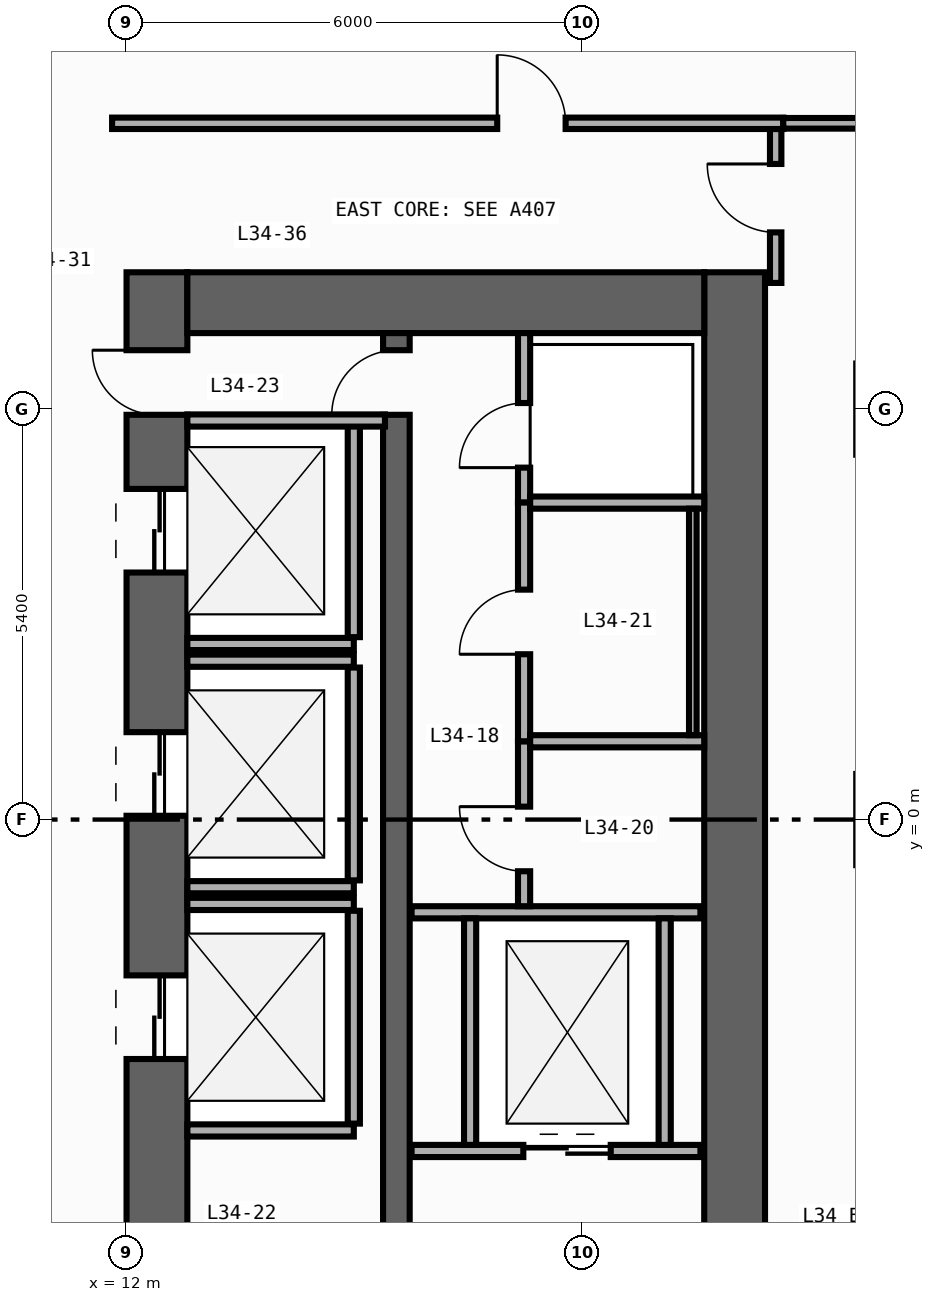
"""IFC4 building model, lengths in metres.
Left out: names, types, materials, properties, quantities, classifications, styles, units other than length and angle.
Written with IfcOpenShell. Run it as: python <this file> out.ifc"""

import sys

from ifc_helpers import new_model, si_unit, direction, frame, frame_2d, origin, origin_2d, place, context, subcontext, project, spatial, rectangle, extrude, element, fill, save


model = new_model("IFC4")
c1 = context("Model", 3, precision=1e-05, world=origin(), true_north=direction((0.0, 1.0)))
c2 = subcontext(c1, "Body", "Model", "MODEL_VIEW")
j1 = project(units=[si_unit("LENGTHUNIT", "METRE"), si_unit("PLANEANGLEUNIT", "RADIAN")], contexts=[c1])
p1 = place(None, origin())
s1 = spatial("IfcSite", under=j1, at=p1, CompositionType="ELEMENT")
p2 = place(p1, origin())
s2 = spatial("IfcBuilding", under=s1, at=p2, CompositionType="ELEMENT")
p3 = place(p2, frame((0.0, 0.0, 147.8)))
s3 = spatial("IfcBuildingStorey", under=s2, at=p3, CompositionType="ELEMENT", Elevation=147.8)
p4 = place(p3, frame((12.4, -19.8, 0.0), z_axis=(0.0, 0.0, 1.0), x_axis=(0.0, 1.0, 0.0)))
e1 = element("IfcWall", 1, at=p4, inside=s3, PredefinedType="SHEAR", context=c2, shape_type="SweptSolid", body=[
    extrude(rectangle(XDim=27.0, YDim=0.8, at=frame_2d((13.5, 0.0))), origin(), (0.0, 0.0, 1.0), 3.85),
])
p5 = place(p4, frame((23.05, 0.0, 0.0)))
e2 = element("IfcOpeningElement", 2, at=p5, cuts=e1, PredefinedType="OPENING", context=c2, shape_type="SweptSolid", body=[
    extrude(rectangle(XDim=1.1, YDim=2.2, at=frame_2d((0.55, 1.1))), frame((0.0, 0.41, 0.0), z_axis=(0.0, -1.0, 0.0), x_axis=(1.0, 0.0, 0.0)), (0.0, 0.0, 1.0), 0.82),
])
p6 = place(p4, frame((19.85, 0.0, 0.0)))
e3 = element("IfcOpeningElement", 3, at=p6, cuts=e1, PredefinedType="OPENING", context=c2, shape_type="SweptSolid", body=[
    extrude(rectangle(XDim=1.1, YDim=2.2, at=frame_2d((0.55, 1.1))), frame((0.0, 0.41, 0.0), z_axis=(0.0, -1.0, 0.0), x_axis=(1.0, 0.0, 0.0)), (0.0, 0.0, 1.0), 0.82),
])
p7 = place(p4, frame((16.65, 0.0, 0.0)))
e4 = element("IfcOpeningElement", 4, at=p7, cuts=e1, PredefinedType="OPENING", context=c2, shape_type="SweptSolid", body=[
    extrude(rectangle(XDim=1.1, YDim=2.2, at=frame_2d((0.55, 1.1))), frame((0.0, 0.41, 0.0), z_axis=(0.0, -1.0, 0.0), x_axis=(1.0, 0.0, 0.0)), (0.0, 0.0, 1.0), 0.82),
])
p8 = place(p4, frame((6.275, 0.0, 0.0)))
e5 = element("IfcOpeningElement", 5, at=p8, cuts=e1, PredefinedType="OPENING", context=c2, shape_type="SweptSolid", body=[
    extrude(rectangle(XDim=0.85, YDim=2.1, at=frame_2d((0.425, 1.05))), frame((0.0, 0.41, 0.0), z_axis=(0.0, -1.0, 0.0), x_axis=(1.0, 0.0, 0.0)), (0.0, 0.0, 1.0), 0.82),
])
p9 = place(p4, frame((8.575, 0.0, 0.0)))
e6 = element("IfcOpeningElement", 6, at=p9, cuts=e1, PredefinedType="OPENING", context=c2, shape_type="SweptSolid", body=[
    extrude(rectangle(XDim=0.85, YDim=2.1, at=frame_2d((0.425, 1.05))), frame((0.0, 0.41, 0.0), z_axis=(0.0, -1.0, 0.0), x_axis=(1.0, 0.0, 0.0)), (0.0, 0.0, 1.0), 0.82),
])
p10 = place(p4, frame((10.675, 0.0, 0.0)))
e7 = element("IfcOpeningElement", 7, at=p10, cuts=e1, PredefinedType="OPENING", context=c2, shape_type="SweptSolid", body=[
    extrude(rectangle(XDim=0.85, YDim=2.1, at=frame_2d((0.425, 1.05))), frame((0.0, 0.41, 0.0), z_axis=(0.0, -1.0, 0.0), x_axis=(1.0, 0.0, 0.0)), (0.0, 0.0, 1.0), 0.82),
])
p11 = place(p4, frame((12.725, 0.0, 0.0)))
e8 = element("IfcOpeningElement", 8, at=p11, cuts=e1, PredefinedType="OPENING", context=c2, shape_type="SweptSolid", body=[
    extrude(rectangle(XDim=1.15, YDim=2.2, at=frame_2d((0.575, 1.1))), frame((0.0, 0.41, 0.0), z_axis=(0.0, -1.0, 0.0), x_axis=(1.0, 0.0, 0.0)), (0.0, 0.0, 1.0), 0.82),
])
p12 = place(p4, frame((25.125, 0.0, 0.0)))
e9 = element("IfcOpeningElement", 9, at=p12, cuts=e1, PredefinedType="OPENING", context=c2, shape_type="SweptSolid", body=[
    extrude(rectangle(XDim=0.85, YDim=2.1, at=frame_2d((0.425, 1.05))), frame((0.0, 0.41, 0.0), z_axis=(0.0, -1.0, 0.0), x_axis=(1.0, 0.0, 0.0)), (0.0, 0.0, 1.0), 0.82),
])
p13 = place(p3, frame((20.0, -19.8, 0.0), z_axis=(0.0, 0.0, 1.0), x_axis=(0.0, 1.0, 0.0)))
e10 = element("IfcWall", 10, at=p13, inside=s3, PredefinedType="SHEAR", context=c2, shape_type="SweptSolid", body=[
    extrude(rectangle(XDim=27.0, YDim=0.8, at=frame_2d((13.5, 0.0))), origin(), (0.0, 0.0, 1.0), 3.85),
])
p14 = place(p3, frame((12.8, 6.8, 0.0), z_axis=(0.0, 0.0, 1.0), x_axis=(1.0, 0.0, 0.0)))
e11 = element("IfcWall", 11, at=p14, inside=s3, PredefinedType="SHEAR", context=c2, shape_type="SweptSolid", body=[
    extrude(rectangle(XDim=6.8, YDim=0.8, at=frame_2d((3.4, 0.0))), origin(), (0.0, 0.0, 1.0), 3.85),
])
p15 = place(p3, frame((15.55, -19.0, 0.0), z_axis=(0.0, 0.0, 1.0), x_axis=(0.0, 1.0, 0.0)))
e12 = element("IfcWall", 12, at=p15, inside=s3, PredefinedType="SHEAR", context=c2, shape_type="SweptSolid", body=[
    extrude(rectangle(XDim=25.4, YDim=0.35, at=frame_2d((12.7, 0.0))), origin(), (0.0, 0.0, 1.0), 3.85),
])
p16 = place(p15, frame((11.925, 0.0, 0.0)))
e13 = element("IfcOpeningElement", 13, at=p16, cuts=e12, PredefinedType="OPENING", context=c2, shape_type="SweptSolid", body=[
    extrude(rectangle(XDim=1.15, YDim=2.2, at=frame_2d((0.575, 1.1))), frame((0.0, 0.185, 0.0), z_axis=(0.0, -1.0, 0.0), x_axis=(1.0, 0.0, 0.0)), (0.0, 0.0, 1.0), 0.37),
])
p17 = place(p15, frame((24.325, 0.0, 0.0)))
e14 = element("IfcOpeningElement", 14, at=p17, cuts=e12, PredefinedType="OPENING", context=c2, shape_type="SweptSolid", body=[
    extrude(rectangle(XDim=0.85, YDim=2.1, at=frame_2d((0.425, 1.05))), frame((0.0, 0.185, 0.0), z_axis=(0.0, -1.0, 0.0), x_axis=(1.0, 0.0, 0.0)), (0.0, 0.0, 1.0), 0.37),
])
for number, where, z_axis, x_axis in (
    (15, (22.2, 0.0, 0.0), (0.0, 0.0, 1.0), (1.0, 0.0, 0.0)),
    (16, (22.2, 5.4, 0.0), (0.0, 0.0, 1.0), (1.0, 0.0, 0.0)),
):
    element("IfcColumn", number, at=place(p3, frame(where, z_axis=z_axis, x_axis=x_axis)), inside=s3, PredefinedType="COLUMN", context=c2, shape_type="SweptSolid", body=[
        extrude(rectangle(XDim=1.2, YDim=1.2, at=origin_2d()), origin(), (0.0, 0.0, 1.0), 4.2),
    ])
p18 = place(p3, frame((12.8, 2.31, 0.0), z_axis=(0.0, 0.0, 1.0), x_axis=(1.0, 0.0, 0.0)))
e17 = element("IfcWall", 17, at=p18, inside=s3, PredefinedType="STANDARD", context=c2, shape_type="SweptSolid", body=[
    extrude(rectangle(XDim=2.19, YDim=0.16, at=frame_2d((1.095, 0.0))), origin(), (0.0, 0.0, 1.0), 3.85),
])
p19 = place(p3, frame((14.99, 2.4, 0.0), z_axis=(0.0, 0.0, 1.0), x_axis=(0.0, 1.0, 0.0)))
e18 = element("IfcWall", 18, at=p19, inside=s3, PredefinedType="STANDARD", context=c2, shape_type="SweptSolid", body=[
    extrude(rectangle(XDim=2.8, YDim=0.16, at=frame_2d((1.4, 0.0))), origin(), (0.0, 0.0, 1.0), 3.85),
])
for number, where, z_axis, x_axis in (
    (19, (12.8, -0.89, 0.0), (0.0, 0.0, 1.0), (1.0, 0.0, 0.0)),
    (20, (12.8, 2.09, 0.0), (0.0, 0.0, 1.0), (1.0, 0.0, 0.0)),
):
    element("IfcWall", number, at=place(p3, frame(where, z_axis=z_axis, x_axis=x_axis)), inside=s3, PredefinedType="STANDARD", context=c2, shape_type="SweptSolid", body=[
        extrude(rectangle(XDim=2.19, YDim=0.16, at=frame_2d((1.095, 0.0))), origin(), (0.0, 0.0, 1.0), 3.85),
    ])
p20 = place(p3, frame((14.99, -0.8, 0.0), z_axis=(0.0, 0.0, 1.0), x_axis=(0.0, 1.0, 0.0)))
e21 = element("IfcWall", 21, at=p20, inside=s3, PredefinedType="STANDARD", context=c2, shape_type="SweptSolid", body=[
    extrude(rectangle(XDim=2.8, YDim=0.16, at=frame_2d((1.4, 0.0))), origin(), (0.0, 0.0, 1.0), 3.85),
])
for number, where, z_axis, x_axis in (
    (22, (12.8, -4.09, 0.0), (0.0, 0.0, 1.0), (1.0, 0.0, 0.0)),
    (23, (12.8, -1.11, 0.0), (0.0, 0.0, 1.0), (1.0, 0.0, 0.0)),
):
    element("IfcWall", number, at=place(p3, frame(where, z_axis=z_axis, x_axis=x_axis)), inside=s3, PredefinedType="STANDARD", context=c2, shape_type="SweptSolid", body=[
        extrude(rectangle(XDim=2.19, YDim=0.16, at=frame_2d((1.095, 0.0))), origin(), (0.0, 0.0, 1.0), 3.85),
    ])
p21 = place(p3, frame((14.99, -4.0, 0.0), z_axis=(0.0, 0.0, 1.0), x_axis=(0.0, 1.0, 0.0)))
e24 = element("IfcWall", 24, at=p21, inside=s3, PredefinedType="STANDARD", context=c2, shape_type="SweptSolid", body=[
    extrude(rectangle(XDim=2.8, YDim=0.16, at=frame_2d((1.4, 0.0))), origin(), (0.0, 0.0, 1.0), 3.85),
])
p22 = place(p3, frame((15.75, -4.36, 0.0), z_axis=(0.0, 0.0, 1.0), x_axis=(1.0, 0.0, 0.0)))
e25 = element("IfcWall", 25, at=p22, inside=s3, PredefinedType="STANDARD", context=c2, shape_type="SweptSolid", body=[
    extrude(rectangle(XDim=3.8, YDim=0.16, at=frame_2d((1.9, 0.0))), origin(), (0.0, 0.0, 1.0), 3.85),
])
p23 = place(p22, frame((1.47, 0.0, 0.0)))
e26 = element("IfcOpeningElement", 26, at=p23, cuts=e25, PredefinedType="OPENING", context=c2, shape_type="SweptSolid", body=[
    extrude(rectangle(XDim=1.15, YDim=2.2, at=frame_2d((0.575, 1.1))), frame((0.0, 0.09, 0.0), z_axis=(0.0, -1.0, 0.0), x_axis=(1.0, 0.0, 0.0)), (0.0, 0.0, 1.0), 0.18),
])
p24 = place(p3, frame((15.75, -1.22, 0.0), z_axis=(0.0, 0.0, 1.0), x_axis=(1.0, 0.0, 0.0)))
e27 = element("IfcWall", 27, at=p24, inside=s3, PredefinedType="STANDARD", context=c2, shape_type="SweptSolid", body=[
    extrude(rectangle(XDim=3.8, YDim=0.16, at=frame_2d((1.9, 0.0))), origin(), (0.0, 0.0, 1.0), 3.85),
])
for number, where, z_axis, x_axis in (
    (28, (16.52, -4.28, 0.0), (0.0, 0.0, 1.0), (0.0, 1.0, 0.0)),
    (29, (19.08, -4.28, 0.0), (0.0, 0.0, 1.0), (0.0, 1.0, 0.0)),
):
    element("IfcWall", number, at=place(p3, frame(where, z_axis=z_axis, x_axis=x_axis)), inside=s3, PredefinedType="STANDARD", context=c2, shape_type="SweptSolid", body=[
        extrude(rectangle(XDim=2.98, YDim=0.16, at=frame_2d((1.49, 0.0))), origin(), (0.0, 0.0, 1.0), 3.85),
    ])
p25 = place(p3, frame((12.8, 5.25, 0.0), z_axis=(0.0, 0.0, 1.0), x_axis=(1.0, 0.0, 0.0)))
e30 = element("IfcWall", 30, at=p25, inside=s3, PredefinedType="STANDARD", context=c2, shape_type="SweptSolid", body=[
    extrude(rectangle(XDim=2.6, YDim=0.16, at=frame_2d((1.3, 0.0))), origin(), (0.0, 0.0, 1.0), 3.85),
])
p26 = place(p3, frame((17.23, 4.17, 0.0), z_axis=(0.0, 0.0, 1.0), x_axis=(0.0, 1.0, 0.0)))
e31 = element("IfcWall", 31, at=p26, inside=s3, PredefinedType="PARTITIONING", context=c2, shape_type="SweptSolid", body=[
    extrude(rectangle(XDim=2.23, YDim=0.16, at=frame_2d((1.115, 0.0))), origin(), (0.0, 0.0, 1.0), 3.85),
])
p27 = place(p26, frame((0.46, 0.0, 0.0)))
e32 = element("IfcOpeningElement", 32, at=p27, cuts=e31, PredefinedType="OPENING", context=c2, shape_type="SweptSolid", body=[
    extrude(rectangle(XDim=0.85, YDim=2.1, at=frame_2d((0.425, 1.05))), frame((0.0, 0.09, 0.0), z_axis=(0.0, -1.0, 0.0), x_axis=(1.0, 0.0, 0.0)), (0.0, 0.0, 1.0), 0.18),
])
p28 = place(p3, frame((17.23, -1.14, 0.0), z_axis=(0.0, 0.0, 1.0), x_axis=(0.0, 1.0, 0.0)))
e33 = element("IfcWall", 33, at=p28, inside=s3, PredefinedType="PARTITIONING", context=c2, shape_type="SweptSolid", body=[
    extrude(rectangle(XDim=2.17, YDim=0.16, at=frame_2d((1.085, 0.0))), origin(), (0.0, 0.0, 1.0), 3.85),
])
p29 = place(p28, frame((0.46, 0.0, 0.0)))
e34 = element("IfcOpeningElement", 34, at=p29, cuts=e33, PredefinedType="OPENING", context=c2, shape_type="SweptSolid", body=[
    extrude(rectangle(XDim=0.85, YDim=2.1, at=frame_2d((0.425, 1.05))), frame((0.0, 0.09, 0.0), z_axis=(0.0, -1.0, 0.0), x_axis=(1.0, 0.0, 0.0)), (0.0, 0.0, 1.0), 0.18),
])
p30 = place(p3, frame((17.23, 1.03, 0.0), z_axis=(0.0, 0.0, 1.0), x_axis=(0.0, 1.0, 0.0)))
e35 = element("IfcWall", 35, at=p30, inside=s3, PredefinedType="PARTITIONING", context=c2, shape_type="SweptSolid", body=[
    extrude(rectangle(XDim=3.14, YDim=0.16, at=frame_2d((1.57, 0.0))), origin(), (0.0, 0.0, 1.0), 3.85),
])
p31 = place(p30, frame((1.145, 0.0, 0.0)))
e36 = element("IfcOpeningElement", 36, at=p31, cuts=e35, PredefinedType="OPENING", context=c2, shape_type="SweptSolid", body=[
    extrude(rectangle(XDim=0.85, YDim=2.1, at=frame_2d((0.425, 1.05))), frame((0.0, 0.09, 0.0), z_axis=(0.0, -1.0, 0.0), x_axis=(1.0, 0.0, 0.0)), (0.0, 0.0, 1.0), 0.18),
])
for number, where, z_axis, x_axis in (
    (37, (17.31, 4.17, 0.0), (0.0, 0.0, 1.0), (1.0, 0.0, 0.0)),
    (38, (17.31, 1.03, 0.0), (0.0, 0.0, 1.0), (1.0, 0.0, 0.0)),
):
    element("IfcWall", number, at=place(p3, frame(where, z_axis=z_axis, x_axis=x_axis)), inside=s3, PredefinedType="PARTITIONING", context=c2, shape_type="SweptSolid", body=[
        extrude(rectangle(XDim=2.29, YDim=0.16, at=frame_2d((1.145, 0.0))), origin(), (0.0, 0.0, 1.0), 3.85),
    ])
p32 = place(p3, frame((20.54, 7.06, 0.0), z_axis=(0.0, 0.0, 1.0), x_axis=(0.0, 1.0, 0.0)))
e39 = element("IfcWall", 39, at=p32, inside=s3, PredefinedType="PARTITIONING", context=c2, shape_type="SweptSolid", body=[
    extrude(rectangle(XDim=2.025, YDim=0.15, at=frame_2d((1.012, 0.0))), origin(), (0.0, 0.0, 1.0), 3.85),
])
p33 = place(p32, frame((0.665, 0.0, 0.0)))
e40 = element("IfcOpeningElement", 40, at=p33, cuts=e39, PredefinedType="OPENING", context=c2, shape_type="SweptSolid", body=[
    extrude(rectangle(XDim=0.9, YDim=2.15, at=frame_2d((0.45, 1.075))), frame((0.0, 0.085, 0.0), z_axis=(0.0, -1.0, 0.0), x_axis=(1.0, 0.0, 0.0)), (0.0, 0.0, 1.0), 0.17),
])
p34 = place(p3, frame((11.81, 9.16, 0.0), z_axis=(0.0, 0.0, 1.0), x_axis=(1.0, 0.0, 0.0)))
e41 = element("IfcWall", 41, at=p34, inside=s3, PredefinedType="PARTITIONING", context=c2, shape_type="SweptSolid", body=[
    extrude(rectangle(XDim=8.83, YDim=0.15, at=frame_2d((4.415, 0.0))), origin(), (0.0, 0.0, 1.0), 3.85),
])
p35 = place(p34, frame((5.067, 0.0, 0.0)))
e42 = element("IfcOpeningElement", 42, at=p35, cuts=e41, PredefinedType="OPENING", context=c2, shape_type="SweptSolid", body=[
    extrude(rectangle(XDim=0.9, YDim=2.15, at=frame_2d((0.45, 1.075))), frame((0.0, 0.085, 0.0), z_axis=(0.0, -1.0, 0.0), x_axis=(1.0, 0.0, 0.0)), (0.0, 0.0, 1.0), 0.17),
])
p36 = place(p3, frame((20.64, 9.16, 0.0), z_axis=(0.0, 0.0, 1.0), x_axis=(1.0, 0.0, 0.0)))
e43 = element("IfcWall", 43, at=p36, inside=s3, PredefinedType="PARTITIONING", context=c2, shape_type="SweptSolid", body=[
    extrude(rectangle(XDim=2.815, YDim=0.14, at=frame_2d((1.408, 0.0))), origin(), (0.0, 0.0, 1.0), 3.85),
])
p37 = place(p3, frame((19.45, 4.09, 0.0), z_axis=(0.0, 0.0, 1.0), x_axis=(0.0, -1.0, 0.0)))
e44 = element("IfcWall", 44, at=p37, inside=s3, PredefinedType="PARTITIONING", context=c2, shape_type="SweptSolid", body=[
    extrude(rectangle(XDim=2.98, YDim=0.1, at=frame_2d((1.49, 0.0))), origin(), (0.0, 0.0, 1.0), 3.85),
])
p38 = place(p5, origin())
e45 = element("IfcDoor", 45, at=p38, inside=s3, OperationType="DOUBLE_DOOR_SLIDING", PredefinedType="DOOR", context=c2, shape_type="SweptSolid", body=[
    extrude(rectangle(XDim=1.1, YDim=2.2, at=frame_2d((0.55, 1.1))), frame((0.0, 0.025, 0.0), z_axis=(0.0, -1.0, 0.0), x_axis=(1.0, 0.0, 0.0)), (0.0, 0.0, 1.0), 0.05),
])
fill(e2, e45)
p39 = place(p6, origin())
e46 = element("IfcDoor", 46, at=p39, inside=s3, OperationType="DOUBLE_DOOR_SLIDING", PredefinedType="DOOR", context=c2, shape_type="SweptSolid", body=[
    extrude(rectangle(XDim=1.1, YDim=2.2, at=frame_2d((0.55, 1.1))), frame((0.0, 0.025, 0.0), z_axis=(0.0, -1.0, 0.0), x_axis=(1.0, 0.0, 0.0)), (0.0, 0.0, 1.0), 0.05),
])
fill(e3, e46)
p40 = place(p7, origin())
e47 = element("IfcDoor", 47, at=p40, inside=s3, OperationType="DOUBLE_DOOR_SLIDING", PredefinedType="DOOR", context=c2, shape_type="SweptSolid", body=[
    extrude(rectangle(XDim=1.1, YDim=2.2, at=frame_2d((0.55, 1.1))), frame((0.0, 0.025, 0.0), z_axis=(0.0, -1.0, 0.0), x_axis=(1.0, 0.0, 0.0)), (0.0, 0.0, 1.0), 0.05),
])
fill(e4, e47)
p41 = place(p12, origin())
e48 = element("IfcDoor", 48, at=p41, inside=s3, OperationType="SINGLE_SWING_RIGHT", PredefinedType="DOOR", context=c2, shape_type="SweptSolid", body=[
    extrude(rectangle(XDim=0.85, YDim=2.1, at=frame_2d((0.425, 1.05))), frame((0.0, 0.025, 0.0), z_axis=(0.0, -1.0, 0.0), x_axis=(1.0, 0.0, 0.0)), (0.0, 0.0, 1.0), 0.05),
])
fill(e9, e48)
p42 = place(p17, origin())
e49 = element("IfcDoor", 49, at=p42, inside=s3, OperationType="SINGLE_SWING_LEFT", PredefinedType="DOOR", context=c2, shape_type="SweptSolid", body=[
    extrude(rectangle(XDim=0.85, YDim=2.1, at=frame_2d((0.425, 1.05))), frame((0.0, 0.025, 0.0), z_axis=(0.0, -1.0, 0.0), x_axis=(1.0, 0.0, 0.0)), (0.0, 0.0, 1.0), 0.05),
])
fill(e14, e49)
p43 = place(p23, origin())
e50 = element("IfcDoor", 50, at=p43, inside=s3, OperationType="DOUBLE_DOOR_SLIDING", PredefinedType="DOOR", context=c2, shape_type="SweptSolid", body=[
    extrude(rectangle(XDim=1.15, YDim=2.2, at=frame_2d((0.575, 1.1))), frame((0.0, 0.025, 0.0), z_axis=(0.0, -1.0, 0.0), x_axis=(1.0, 0.0, 0.0)), (0.0, 0.0, 1.0), 0.05),
])
fill(e26, e50)
p44 = place(p27, origin())
e51 = element("IfcDoor", 51, at=p44, inside=s3, OperationType="SINGLE_SWING_LEFT", PredefinedType="DOOR", context=c2, shape_type="SweptSolid", body=[
    extrude(rectangle(XDim=0.85, YDim=2.1, at=frame_2d((0.425, 1.05))), frame((0.0, 0.025, 0.0), z_axis=(0.0, -1.0, 0.0), x_axis=(1.0, 0.0, 0.0)), (0.0, 0.0, 1.0), 0.05),
])
fill(e32, e51)
p45 = place(p29, origin())
e52 = element("IfcDoor", 52, at=p45, inside=s3, OperationType="SINGLE_SWING_RIGHT", PredefinedType="DOOR", context=c2, shape_type="SweptSolid", body=[
    extrude(rectangle(XDim=0.85, YDim=2.1, at=frame_2d((0.425, 1.05))), frame((0.0, 0.025, 0.0), z_axis=(0.0, -1.0, 0.0), x_axis=(1.0, 0.0, 0.0)), (0.0, 0.0, 1.0), 0.05),
])
fill(e34, e52)
p46 = place(p31, origin())
e53 = element("IfcDoor", 53, at=p46, inside=s3, OperationType="SINGLE_SWING_LEFT", PredefinedType="DOOR", context=c2, shape_type="SweptSolid", body=[
    extrude(rectangle(XDim=0.85, YDim=2.1, at=frame_2d((0.425, 1.05))), frame((0.0, 0.025, 0.0), z_axis=(0.0, -1.0, 0.0), x_axis=(1.0, 0.0, 0.0)), (0.0, 0.0, 1.0), 0.05),
])
fill(e36, e53)
p47 = place(p33, origin())
e54 = element("IfcDoor", 54, at=p47, inside=s3, OperationType="SINGLE_SWING_RIGHT", PredefinedType="DOOR", context=c2, shape_type="SweptSolid", body=[
    extrude(rectangle(XDim=0.9, YDim=2.15, at=frame_2d((0.45, 1.075))), frame((0.0, 0.025, 0.0), z_axis=(0.0, -1.0, 0.0), x_axis=(1.0, 0.0, 0.0)), (0.0, 0.0, 1.0), 0.05),
])
fill(e40, e54)
p48 = place(p35, origin())
e55 = element("IfcDoor", 55, at=p48, inside=s3, OperationType="SINGLE_SWING_LEFT", PredefinedType="DOOR", context=c2, shape_type="SweptSolid", body=[
    extrude(rectangle(XDim=0.9, YDim=2.15, at=frame_2d((0.45, 1.075))), frame((0.0, 0.025, 0.0), z_axis=(0.0, -1.0, 0.0), x_axis=(1.0, 0.0, 0.0)), (0.0, 0.0, 1.0), 0.05),
])
fill(e42, e55)
save(model, sys.argv[1])
